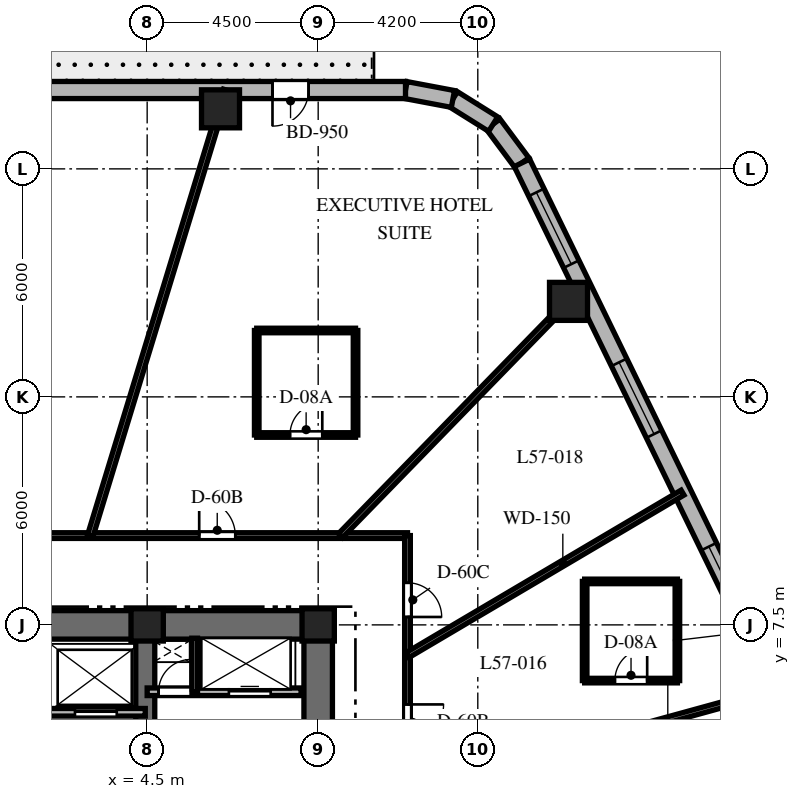
"""IFC4 building model, lengths in metres.
Left out: names, types, materials, properties, quantities, classifications, styles, units other than length and angle.
Written with IfcOpenShell. Run it as: python <this file> out.ifc"""

import sys

from ifc_helpers import new_model, si_unit, direction, frame, frame_2d, origin, origin_2d, place, context, subcontext, project, spatial, rectangle, extrude, element, fill, save


model = new_model("IFC4")
c1 = context("Model", 3, precision=1e-05, world=origin(), true_north=direction((0.0, 1.0)))
c2 = subcontext(c1, "Body", "Model", "MODEL_VIEW")
j1 = project(units=[si_unit("LENGTHUNIT", "METRE"), si_unit("PLANEANGLEUNIT", "RADIAN")], contexts=[c1])
p1 = place(None, origin())
s1 = spatial("IfcSite", under=j1, at=p1, CompositionType="ELEMENT")
p2 = place(p1, origin())
s2 = spatial("IfcBuilding", under=s1, at=p2, CompositionType="ELEMENT")
p3 = place(p2, frame((0.0, 0.0, 229.3)))
s3 = spatial("IfcBuildingStorey", under=s2, at=p3, CompositionType="ELEMENT", Elevation=229.3)
p4 = place(p3, frame((1.85, 7.5, 0.0), z_axis=(0.0, 0.0, 1.0), x_axis=(1.0, 0.0, 0.0)))
e1 = element("IfcWall", 1, at=p4, inside=s3, PredefinedType="SHEAR", context=c2, shape_type="SweptSolid", body=[
    extrude(rectangle(XDim=7.525, YDim=0.75, at=frame_2d((3.762, 0.0))), origin(), (0.0, 0.0, 1.0), 3.8),
])
p5 = place(p3, frame((9.0, -7.125, 0.0), z_axis=(0.0, 0.0, 1.0), x_axis=(0.0, 1.0, 0.0)))
e2 = element("IfcWall", 2, at=p5, inside=s3, PredefinedType="SHEAR", context=c2, shape_type="SweptSolid", body=[
    extrude(rectangle(XDim=14.25, YDim=0.75, at=frame_2d((7.125, 0.0))), origin(), (0.0, 0.0, 1.0), 3.8),
])
p6 = place(p5, frame((10.25, 0.0, 0.0)))
e3 = element("IfcOpeningElement", 3, at=p6, cuts=e2, PredefinedType="OPENING", context=c2, shape_type="SweptSolid", body=[
    extrude(rectangle(XDim=1.05, YDim=2.15, at=frame_2d((0.525, 1.075))), frame((0.0, 0.385, 0.0), z_axis=(0.0, -1.0, 0.0), x_axis=(1.0, 0.0, 0.0)), (0.0, 0.0, 1.0), 0.77),
])
p7 = place(p3, frame((4.45, 2.25, 0.0), z_axis=(0.0, 0.0, 1.0), x_axis=(0.0, 1.0, 0.0)))
e4 = element("IfcWall", 4, at=p7, inside=s3, PredefinedType="SHEAR", context=c2, shape_type="SweptSolid", body=[
    extrude(rectangle(XDim=4.875, YDim=0.5, at=frame_2d((2.438, 0.0))), origin(), (0.0, 0.0, 1.0), 3.8),
])
for number, where, z_axis, x_axis in (
    (5, (9.0, 7.5, 0.0), (0.0, 0.0, 1.0), (1.0, 0.0, 0.0)),
    (6, (4.5, 7.5, 0.0), (0.0, 0.0, 1.0), (1.0, 0.0, 0.0)),
):
    element("IfcColumn", number, at=place(p3, frame(where, z_axis=z_axis, x_axis=x_axis)), inside=s3, PredefinedType="COLUMN", context=c2, shape_type="SweptSolid", body=[
        extrude(rectangle(XDim=0.85, YDim=0.85, at=origin_2d()), origin(), (0.0, 0.0, 1.0), 3.8),
    ])
for number, where, z_axis, x_axis in (
    (7, (15.587, 16.013, 0.0), (0.0, 0.0, 1.0), (1.0, 0.0, 0.0)),
    (8, (6.43, 21.08, 0.0), (0.0, 0.0, 1.0), (1.0, 0.0, 0.0)),
):
    element("IfcColumn", number, at=place(p3, frame(where, z_axis=z_axis, x_axis=x_axis)), inside=s3, PredefinedType="COLUMN", context=c2, shape_type="SweptSolid", body=[
        extrude(rectangle(XDim=1.0, YDim=1.0, at=origin_2d()), origin(), (0.0, 0.0, 1.0), 3.8),
    ])
p8 = place(p3, frame((14.362, 19.658, 0.0), z_axis=(0.0, 0.0, 1.0), x_axis=(-0.596642462792, 0.80250717853, 0.0)))
e9 = element("IfcWall", 9, at=p8, inside=s3, PredefinedType="SOLIDWALL", context=c2, shape_type="SweptSolid", body=[
    extrude(rectangle(XDim=1.27, YDim=0.45, at=frame_2d((0.635, 0.0))), origin(), (0.0, 0.0, 1.0), 3.5),
])
p9 = place(p3, frame((13.604, 20.678, 0.0), z_axis=(0.0, 0.0, 1.0), x_axis=(-0.847910404124, 0.53013955387, 0.0)))
e10 = element("IfcWall", 10, at=p9, inside=s3, PredefinedType="SOLIDWALL", context=c2, shape_type="SweptSolid", body=[
    extrude(rectangle(XDim=1.249, YDim=0.45, at=frame_2d((0.624, 0.0))), origin(), (0.0, 0.0, 1.0), 3.5),
])
p10 = place(p3, frame((12.546, 21.34, 0.0), z_axis=(0.0, 0.0, 1.0), x_axis=(-0.982686750835, 0.18527479519, 0.0)))
e11 = element("IfcWall", 11, at=p10, inside=s3, PredefinedType="SOLIDWALL", context=c2, shape_type="SweptSolid", body=[
    extrude(rectangle(XDim=1.27, YDim=0.45, at=frame_2d((0.635, 0.0))), origin(), (0.0, 0.0, 1.0), 3.5),
])
p11 = place(p3, frame((22.74, 2.452, 0.0), z_axis=(0.0, 0.0, 1.0), x_axis=(-0.437753424814, 0.899095066755, 0.0)))
e12 = element("IfcWall", 12, at=p11, inside=s3, PredefinedType="SOLIDWALL", context=c2, shape_type="SweptSolid", body=[
    extrude(rectangle(XDim=19.137, YDim=0.45, at=frame_2d((9.569, 0.0))), origin(), (0.0, 0.0, 1.0), 3.5),
])
p12 = place(p11, frame((5.805, 0.0, 0.8)))
e13 = element("IfcOpeningElement", 13, at=p12, cuts=e12, PredefinedType="OPENING", context=c2, shape_type="SweptSolid", body=[
    extrude(rectangle(XDim=2.1, YDim=1.85, at=frame_2d((1.05, 0.925))), frame((0.0, 0.235, 0.0), z_axis=(0.0, -1.0, 0.0), x_axis=(1.0, 0.0, 0.0)), (0.0, 0.0, 1.0), 0.47),
])
p13 = place(p11, frame((11.199, 0.0, 0.8)))
e14 = element("IfcOpeningElement", 14, at=p13, cuts=e12, PredefinedType="OPENING", context=c2, shape_type="SweptSolid", body=[
    extrude(rectangle(XDim=2.1, YDim=1.85, at=frame_2d((1.05, 0.925))), frame((0.0, 0.235, 0.0), z_axis=(0.0, -1.0, 0.0), x_axis=(1.0, 0.0, 0.0)), (0.0, 0.0, 1.0), 0.47),
])
p14 = place(p11, frame((16.173, 0.0, 0.8)))
e15 = element("IfcOpeningElement", 15, at=p14, cuts=e12, PredefinedType="OPENING", context=c2, shape_type="SweptSolid", body=[
    extrude(rectangle(XDim=2.1, YDim=1.85, at=frame_2d((1.05, 0.925))), frame((0.0, 0.235, 0.0), z_axis=(0.0, -1.0, 0.0), x_axis=(1.0, 0.0, 0.0)), (0.0, 0.0, 1.0), 0.47),
])
p15 = place(p11, frame((0.916, 0.0, 0.8)))
e16 = element("IfcOpeningElement", 16, at=p15, cuts=e12, PredefinedType="OPENING", context=c2, shape_type="SweptSolid", body=[
    extrude(rectangle(XDim=2.1, YDim=1.85, at=frame_2d((1.05, 0.925))), frame((0.0, 0.235, 0.0), z_axis=(0.0, -1.0, 0.0), x_axis=(1.0, 0.0, 0.0)), (0.0, 0.0, 1.0), 0.47),
])
p16 = place(p3, frame((11.298, 21.575, 0.0), z_axis=(0.0, 0.0, 1.0), x_axis=(-1.0, 0.0, 0.0)))
e17 = element("IfcWall", 17, at=p16, inside=s3, PredefinedType="SOLIDWALL", context=c2, shape_type="SweptSolid", body=[
    extrude(rectangle(XDim=24.399, YDim=0.45, at=frame_2d((12.2, 0.0))), origin(), (0.0, 0.0, 1.0), 3.5),
])
p17 = place(p16, frame((2.55, 0.0, 0.0)))
e18 = element("IfcOpeningElement", 18, at=p17, cuts=e17, PredefinedType="OPENING", context=c2, shape_type="SweptSolid", body=[
    extrude(rectangle(XDim=0.95, YDim=2.15, at=frame_2d((0.475, 1.075))), frame((0.0, 0.235, 0.0), z_axis=(0.0, -1.0, 0.0), x_axis=(1.0, 0.0, 0.0)), (0.0, 0.0, 1.0), 0.47),
])
p18 = place(p16, frame((11.451, 0.0, 0.8)))
e19 = element("IfcOpeningElement", 19, at=p18, cuts=e17, PredefinedType="OPENING", context=c2, shape_type="SweptSolid", body=[
    extrude(rectangle(XDim=1.5, YDim=1.8, at=frame_2d((0.75, 0.9))), frame((0.0, 0.235, 0.0), z_axis=(0.0, -1.0, 0.0), x_axis=(1.0, 0.0, 0.0)), (0.0, 0.0, 1.0), 0.47),
])
p19 = place(p16, frame((21.296, 0.0, 0.8)))
e20 = element("IfcOpeningElement", 20, at=p19, cuts=e17, PredefinedType="OPENING", context=c2, shape_type="SweptSolid", body=[
    extrude(rectangle(XDim=1.5, YDim=1.8, at=frame_2d((0.75, 0.9))), frame((0.0, 0.235, 0.0), z_axis=(0.0, -1.0, 0.0), x_axis=(1.0, 0.0, 0.0)), (0.0, 0.0, 1.0), 0.47),
])
p20 = place(p3, frame((4.5, 5.74, 0.0), z_axis=(0.0, 0.0, 1.0), x_axis=(1.0, 0.0, 0.0)))
e21 = element("IfcWall", 21, at=p20, inside=s3, PredefinedType="PARTITIONING", context=c2, shape_type="SweptSolid", body=[
    extrude(rectangle(XDim=4.05, YDim=0.2, at=frame_2d((2.025, 0.0))), origin(), (0.0, 0.0, 1.0), 3.5),
])
p21 = place(p20, frame((0.3, 0.0, 0.0)))
e22 = element("IfcOpeningElement", 22, at=p21, cuts=e21, PredefinedType="OPENING", context=c2, shape_type="SweptSolid", body=[
    extrude(rectangle(XDim=0.85, YDim=2.03, at=frame_2d((0.425, 1.015))), frame((0.0, 0.11, 0.0), z_axis=(0.0, -1.0, 0.0), x_axis=(1.0, 0.0, 0.0)), (0.0, 0.0, 1.0), 0.22),
])
p22 = place(p20, frame((2.15, 0.0, 0.0)))
e23 = element("IfcOpeningElement", 23, at=p22, cuts=e21, PredefinedType="OPENING", context=c2, shape_type="SweptSolid", body=[
    extrude(rectangle(XDim=1.1, YDim=2.2, at=frame_2d((0.55, 1.1))), frame((0.0, 0.11, 0.0), z_axis=(0.0, -1.0, 0.0), x_axis=(1.0, 0.0, 0.0)), (0.0, 0.0, 1.0), 0.22),
])
p23 = place(p3, frame((5.75, 5.74, 0.0), z_axis=(0.0, 0.0, 1.0), x_axis=(0.0, 1.0, 0.0)))
e24 = element("IfcWall", 24, at=p23, inside=s3, PredefinedType="PARTITIONING", context=c2, shape_type="SweptSolid", body=[
    extrude(rectangle(XDim=1.41, YDim=0.15, at=frame_2d((0.705, 0.0))), origin(), (0.0, 0.0, 1.0), 3.5),
])
p24 = place(p3, frame((1.85, 5.2, 0.0), z_axis=(0.0, 0.0, 1.0), x_axis=(1.0, 0.0, 0.0)))
e25 = element("IfcWall", 25, at=p24, inside=s3, PredefinedType="PARTITIONING", context=c2, shape_type="SweptSolid", body=[
    extrude(rectangle(XDim=2.6, YDim=0.2, at=frame_2d((1.3, 0.0))), origin(), (0.0, 0.0, 1.0), 3.5),
])
p25 = place(p24, frame((0.75, 0.0, 0.0)))
e26 = element("IfcOpeningElement", 26, at=p25, cuts=e25, PredefinedType="OPENING", context=c2, shape_type="SweptSolid", body=[
    extrude(rectangle(XDim=1.1, YDim=2.2, at=frame_2d((0.55, 1.1))), frame((0.0, 0.11, 0.0), z_axis=(0.0, -1.0, 0.0), x_axis=(1.0, 0.0, 0.0)), (0.0, 0.0, 1.0), 0.22),
])
p26 = place(p3, frame((0.92, 9.85, 0.0), z_axis=(0.0, 0.0, 1.0), x_axis=(1.0, 0.0, 0.0)))
e27 = element("IfcWall", 27, at=p26, inside=s3, PredefinedType="PARTITIONING", context=c2, shape_type="SweptSolid", body=[
    extrude(rectangle(XDim=10.43, YDim=0.15, at=frame_2d((5.215, 0.0))), origin(), (0.0, 0.0, 1.0), 2.99),
])
p27 = place(p26, frame((4.949, 0.0, 0.0)))
e28 = element("IfcOpeningElement", 28, at=p27, cuts=e27, PredefinedType="OPENING", context=c2, shape_type="SweptSolid", body=[
    extrude(rectangle(XDim=0.95, YDim=2.03, at=frame_2d((0.475, 1.015))), frame((0.0, 0.085, 0.0), z_axis=(0.0, -1.0, 0.0), x_axis=(1.0, 0.0, 0.0)), (0.0, 0.0, 1.0), 0.17),
])
p28 = place(p3, frame((11.35, 9.85, 0.0), z_axis=(0.0, 0.0, 1.0), x_axis=(0.0, -1.0, 0.0)))
e29 = element("IfcWall", 29, at=p28, inside=s3, PredefinedType="PARTITIONING", context=c2, shape_type="SweptSolid", body=[
    extrude(rectangle(XDim=12.4, YDim=0.15, at=frame_2d((6.2, 0.0))), origin(), (0.0, 0.0, 1.0), 2.99),
])
p29 = place(p28, frame((4.443, 0.0, 0.0)))
e30 = element("IfcOpeningElement", 30, at=p29, cuts=e29, PredefinedType="OPENING", context=c2, shape_type="SweptSolid", body=[
    extrude(rectangle(XDim=0.95, YDim=2.03, at=frame_2d((0.475, 1.015))), frame((0.0, 0.085, 0.0), z_axis=(0.0, -1.0, 0.0), x_axis=(1.0, 0.0, 0.0)), (0.0, 0.0, 1.0), 0.17),
])
p30 = place(p28, frame((1.242, 0.0, 0.0)))
e31 = element("IfcOpeningElement", 31, at=p30, cuts=e29, PredefinedType="OPENING", context=c2, shape_type="SweptSolid", body=[
    extrude(rectangle(XDim=0.9, YDim=2.03, at=frame_2d((0.45, 1.015))), frame((0.0, 0.085, 0.0), z_axis=(0.0, -1.0, 0.0), x_axis=(1.0, 0.0, 0.0)), (0.0, 0.0, 1.0), 0.17),
])
p31 = place(p28, frame((8.835, 0.0, 0.0)))
e32 = element("IfcOpeningElement", 32, at=p31, cuts=e29, PredefinedType="OPENING", context=c2, shape_type="SweptSolid", body=[
    extrude(rectangle(XDim=0.95, YDim=2.03, at=frame_2d((0.475, 1.015))), frame((0.0, 0.085, 0.0), z_axis=(0.0, -1.0, 0.0), x_axis=(1.0, 0.0, 0.0)), (0.0, 0.0, 1.0), 0.17),
])
p32 = place(p3, frame((11.35, 3.121, 0.0), z_axis=(0.0, 0.0, 1.0), x_axis=(0.964212793822, 0.265129568758, 0.0)))
e33 = element("IfcWall", 33, at=p32, inside=s3, PredefinedType="PARTITIONING", context=c2, shape_type="SweptSolid", body=[
    extrude(rectangle(XDim=10.12, YDim=0.15, at=frame_2d((5.06, 0.0))), origin(), (0.0, 0.0, 1.0), 2.74),
])
p33 = place(p3, frame((11.35, 6.705, 0.0), z_axis=(0.0, 0.0, 1.0), x_axis=(0.86097625004, 0.508645158108, 0.0)))
e34 = element("IfcWall", 34, at=p33, inside=s3, PredefinedType="PARTITIONING", context=c2, shape_type="SweptSolid", body=[
    extrude(rectangle(XDim=8.406, YDim=0.15, at=frame_2d((4.203, 0.0))), origin(), (0.0, 0.0, 1.0), 2.74),
])
p34 = place(p3, frame((9.588, 9.85, 0.0), z_axis=(0.0, 0.0, 1.0), x_axis=(0.697519469595, 0.716565830567, 0.0)))
e35 = element("IfcWall", 35, at=p34, inside=s3, PredefinedType="PARTITIONING", context=c2, shape_type="SweptSolid", body=[
    extrude(rectangle(XDim=9.126, YDim=0.15, at=frame_2d((4.563, 0.0))), origin(), (0.0, 0.0, 1.0), 2.74),
])
p35 = place(p3, frame((3.004, 9.85, 0.0), z_axis=(0.0, 0.0, 1.0), x_axis=(0.291775760688, 0.956486751333, 0.0)))
e36 = element("IfcWall", 36, at=p35, inside=s3, PredefinedType="PARTITIONING", context=c2, shape_type="SweptSolid", body=[
    extrude(rectangle(XDim=12.258, YDim=0.15, at=frame_2d((6.129, 0.0))), origin(), (0.0, 0.0, 1.0), 2.74),
])
p36 = place(p3, frame((16.012, 6.034, 0.0), z_axis=(0.0, 0.0, 1.0), x_axis=(1.0, 0.0, 0.0)))
e37 = element("IfcWall", 37, at=p36, inside=s3, PredefinedType="PARTITIONING", context=c2, shape_type="SweptSolid", body=[
    extrude(rectangle(XDim=2.44, YDim=0.12, at=frame_2d((1.22, 0.0))), origin(), (0.0, 0.0, 1.0), 2.94),
])
p37 = place(p36, frame((0.795, 0.0, 0.0)))
e38 = element("IfcOpeningElement", 38, at=p37, cuts=e37, PredefinedType="OPENING", context=c2, shape_type="SweptSolid", body=[
    extrude(rectangle(XDim=0.85, YDim=2.03, at=frame_2d((0.425, 1.015))), frame((0.0, 0.07, 0.0), z_axis=(0.0, -1.0, 0.0), x_axis=(1.0, 0.0, 0.0)), (0.0, 0.0, 1.0), 0.14),
])
p38 = place(p3, frame((18.452, 6.034, 0.0), z_axis=(0.0, 0.0, 1.0), x_axis=(0.0, 1.0, 0.0)))
e39 = element("IfcWall", 39, at=p38, inside=s3, PredefinedType="PARTITIONING", context=c2, shape_type="SweptSolid", body=[
    extrude(rectangle(XDim=2.61, YDim=0.12, at=frame_2d((1.305, 0.0))), origin(), (0.0, 0.0, 1.0), 2.99),
])
p39 = place(p3, frame((18.452, 8.644, 0.0), z_axis=(0.0, 0.0, 1.0), x_axis=(-1.0, 0.0, 0.0)))
e40 = element("IfcWall", 40, at=p39, inside=s3, PredefinedType="PARTITIONING", context=c2, shape_type="SweptSolid", body=[
    extrude(rectangle(XDim=2.44, YDim=0.12, at=frame_2d((1.22, 0.0))), origin(), (0.0, 0.0, 1.0), 3.5),
])
p40 = place(p3, frame((16.012, 8.644, 0.0), z_axis=(0.0, 0.0, 1.0), x_axis=(0.0, -1.0, 0.0)))
e41 = element("IfcWall", 41, at=p40, inside=s3, PredefinedType="PARTITIONING", context=c2, shape_type="SweptSolid", body=[
    extrude(rectangle(XDim=2.61, YDim=0.12, at=frame_2d((1.305, 0.0))), origin(), (0.0, 0.0, 1.0), 2.99),
])
p41 = place(p3, frame((7.383, 12.497, 0.0), z_axis=(0.0, 0.0, 1.0), x_axis=(1.0, 0.0, 0.0)))
e42 = element("IfcWall", 42, at=p41, inside=s3, PredefinedType="PARTITIONING", context=c2, shape_type="SweptSolid", body=[
    extrude(rectangle(XDim=2.6, YDim=0.12, at=frame_2d((1.3, 0.0))), origin(), (0.0, 0.0, 1.0), 2.94),
])
p42 = place(p41, frame((0.875, 0.0, 0.0)))
e43 = element("IfcOpeningElement", 43, at=p42, cuts=e42, PredefinedType="OPENING", context=c2, shape_type="SweptSolid", body=[
    extrude(rectangle(XDim=0.85, YDim=2.03, at=frame_2d((0.425, 1.015))), frame((0.0, 0.07, 0.0), z_axis=(0.0, -1.0, 0.0), x_axis=(1.0, 0.0, 0.0)), (0.0, 0.0, 1.0), 0.14),
])
p43 = place(p3, frame((9.983, 12.497, 0.0), z_axis=(0.0, 0.0, 1.0), x_axis=(0.0, 1.0, 0.0)))
e44 = element("IfcWall", 44, at=p43, inside=s3, PredefinedType="PARTITIONING", context=c2, shape_type="SweptSolid", body=[
    extrude(rectangle(XDim=2.75, YDim=0.12, at=frame_2d((1.375, 0.0))), origin(), (0.0, 0.0, 1.0), 3.072),
])
p44 = place(p3, frame((9.983, 15.247, 0.0), z_axis=(0.0, 0.0, 1.0), x_axis=(-1.0, 0.0, 0.0)))
e45 = element("IfcWall", 45, at=p44, inside=s3, PredefinedType="PARTITIONING", context=c2, shape_type="SweptSolid", body=[
    extrude(rectangle(XDim=2.6, YDim=0.12, at=frame_2d((1.3, 0.0))), origin(), (0.0, 0.0, 1.0), 3.072),
])
p45 = place(p3, frame((7.383, 15.247, 0.0), z_axis=(0.0, 0.0, 1.0), x_axis=(0.0, -1.0, 0.0)))
e46 = element("IfcWall", 46, at=p45, inside=s3, PredefinedType="PARTITIONING", context=c2, shape_type="SweptSolid", body=[
    extrude(rectangle(XDim=2.75, YDim=0.12, at=frame_2d((1.375, 0.0))), origin(), (0.0, 0.0, 1.0), 2.94),
])
p46 = place(p12, origin())
e47 = element("IfcWindow", 47, at=p46, inside=s3, PartitioningType="SINGLE_PANEL", PredefinedType="WINDOW", context=c2, shape_type="SweptSolid", body=[
    extrude(rectangle(XDim=2.1, YDim=1.85, at=frame_2d((1.05, 0.925))), frame((0.0, 0.03, 0.0), z_axis=(0.0, -1.0, 0.0), x_axis=(1.0, 0.0, 0.0)), (0.0, 0.0, 1.0), 0.06),
])
fill(e13, e47)
p47 = place(p13, origin())
e48 = element("IfcWindow", 48, at=p47, inside=s3, PartitioningType="SINGLE_PANEL", PredefinedType="WINDOW", context=c2, shape_type="SweptSolid", body=[
    extrude(rectangle(XDim=2.1, YDim=1.85, at=frame_2d((1.05, 0.925))), frame((0.0, 0.03, 0.0), z_axis=(0.0, -1.0, 0.0), x_axis=(1.0, 0.0, 0.0)), (0.0, 0.0, 1.0), 0.06),
])
fill(e14, e48)
p48 = place(p14, origin())
e49 = element("IfcWindow", 49, at=p48, inside=s3, PartitioningType="SINGLE_PANEL", PredefinedType="WINDOW", context=c2, shape_type="SweptSolid", body=[
    extrude(rectangle(XDim=2.1, YDim=1.85, at=frame_2d((1.05, 0.925))), frame((0.0, 0.03, 0.0), z_axis=(0.0, -1.0, 0.0), x_axis=(1.0, 0.0, 0.0)), (0.0, 0.0, 1.0), 0.06),
])
fill(e15, e49)
p49 = place(p17, origin())
e50 = element("IfcDoor", 50, at=p49, inside=s3, OperationType="SINGLE_SWING_RIGHT", PredefinedType="DOOR", context=c2, shape_type="SweptSolid", body=[
    extrude(rectangle(XDim=0.95, YDim=2.15, at=frame_2d((0.475, 1.075))), frame((0.0, 0.025, 0.0), z_axis=(0.0, -1.0, 0.0), x_axis=(1.0, 0.0, 0.0)), (0.0, 0.0, 1.0), 0.05),
])
fill(e18, e50)
p50 = place(p21, origin())
e51 = element("IfcDoor", 51, at=p50, inside=s3, OperationType="SINGLE_SWING_RIGHT", PredefinedType="DOOR", context=c2, shape_type="SweptSolid", body=[
    extrude(rectangle(XDim=0.85, YDim=2.03, at=frame_2d((0.425, 1.015))), frame((0.0, 0.025, 0.0), z_axis=(0.0, -1.0, 0.0), x_axis=(1.0, 0.0, 0.0)), (0.0, 0.0, 1.0), 0.05),
])
fill(e22, e51)
p51 = place(p22, origin())
e52 = element("IfcDoor", 52, at=p51, inside=s3, OperationType="SLIDING_TO_RIGHT", PredefinedType="DOOR", context=c2, shape_type="SweptSolid", body=[
    extrude(rectangle(XDim=1.1, YDim=2.2, at=frame_2d((0.55, 1.1))), frame((0.0, 0.025, 0.0), z_axis=(0.0, -1.0, 0.0), x_axis=(1.0, 0.0, 0.0)), (0.0, 0.0, 1.0), 0.05),
])
fill(e23, e52)
p52 = place(p25, origin())
e53 = element("IfcDoor", 53, at=p52, inside=s3, OperationType="SLIDING_TO_RIGHT", PredefinedType="DOOR", context=c2, shape_type="SweptSolid", body=[
    extrude(rectangle(XDim=1.1, YDim=2.2, at=frame_2d((0.55, 1.1))), frame((0.0, 0.025, 0.0), z_axis=(0.0, -1.0, 0.0), x_axis=(1.0, 0.0, 0.0)), (0.0, 0.0, 1.0), 0.05),
])
fill(e26, e53)
p53 = place(p29, origin())
e54 = element("IfcDoor", 54, at=p53, inside=s3, OperationType="SINGLE_SWING_LEFT", PredefinedType="DOOR", context=c2, shape_type="SweptSolid", body=[
    extrude(rectangle(XDim=0.95, YDim=2.03, at=frame_2d((0.475, 1.015))), frame((0.0, 0.025, 0.0), z_axis=(0.0, -1.0, 0.0), x_axis=(1.0, 0.0, 0.0)), (0.0, 0.0, 1.0), 0.05),
])
fill(e30, e54)
p54 = place(p37, origin())
e55 = element("IfcDoor", 55, at=p54, inside=s3, OperationType="SINGLE_SWING_RIGHT", PredefinedType="DOOR", context=c2, shape_type="SweptSolid", body=[
    extrude(rectangle(XDim=0.85, YDim=2.03, at=frame_2d((0.425, 1.015))), frame((0.0, 0.025, 0.0), z_axis=(0.0, -1.0, 0.0), x_axis=(1.0, 0.0, 0.0)), (0.0, 0.0, 1.0), 0.05),
])
fill(e38, e55)
p55 = place(p30, origin())
e56 = element("IfcDoor", 56, at=p55, inside=s3, OperationType="SINGLE_SWING_RIGHT", PredefinedType="DOOR", context=c2, shape_type="SweptSolid", body=[
    extrude(rectangle(XDim=0.9, YDim=2.03, at=frame_2d((0.45, 1.015))), frame((0.0, 0.025, 0.0), z_axis=(0.0, -1.0, 0.0), x_axis=(1.0, 0.0, 0.0)), (0.0, 0.0, 1.0), 0.05),
])
fill(e31, e56)
p56 = place(p27, origin())
e57 = element("IfcDoor", 57, at=p56, inside=s3, OperationType="SINGLE_SWING_LEFT", PredefinedType="DOOR", context=c2, shape_type="SweptSolid", body=[
    extrude(rectangle(XDim=0.95, YDim=2.03, at=frame_2d((0.475, 1.015))), frame((0.0, 0.025, 0.0), z_axis=(0.0, -1.0, 0.0), x_axis=(1.0, 0.0, 0.0)), (0.0, 0.0, 1.0), 0.05),
])
fill(e28, e57)
p57 = place(p42, origin())
e58 = element("IfcDoor", 58, at=p57, inside=s3, OperationType="SINGLE_SWING_RIGHT", PredefinedType="DOOR", context=c2, shape_type="SweptSolid", body=[
    extrude(rectangle(XDim=0.85, YDim=2.03, at=frame_2d((0.425, 1.015))), frame((0.0, 0.025, 0.0), z_axis=(0.0, -1.0, 0.0), x_axis=(1.0, 0.0, 0.0)), (0.0, 0.0, 1.0), 0.05),
])
fill(e43, e58)
save(model, sys.argv[1])
